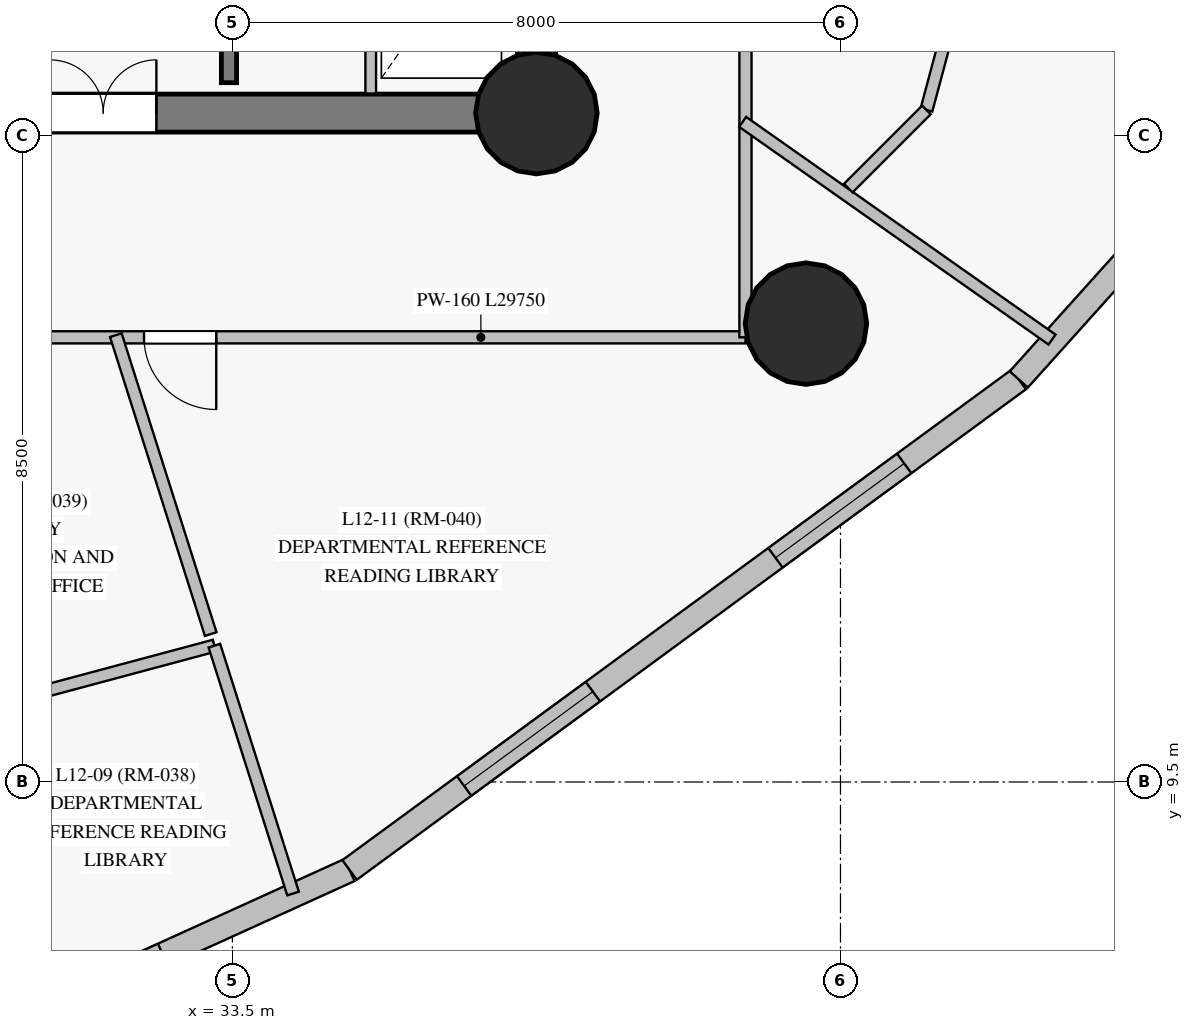
"""IFC4 building model, lengths in metres.
Left out: names, types, materials, properties, quantities, classifications, styles, units other than length and angle.
Written with IfcOpenShell. Run it as: python <this file> out.ifc"""

import sys

from ifc_helpers import new_model, si_unit, direction, frame, frame_2d, origin, origin_with_axes, origin_2d, place, context, subcontext, project, spatial, rectangle, circle, extrude, source, transform, mapped, element, fill, save


model = new_model("IFC4")
c1 = context("Model", 3, precision=1e-05, world=origin(), true_north=direction((0.0, 1.0)))
c2 = subcontext(c1, "Body", "Model", "MODEL_VIEW")
j1 = project(units=[si_unit("LENGTHUNIT", "METRE"), si_unit("PLANEANGLEUNIT", "RADIAN")], contexts=[c1])
p1 = place(None, origin())
s1 = spatial("IfcSite", under=j1, at=p1, CompositionType="ELEMENT")
p2 = place(p1, origin())
s2 = spatial("IfcBuilding", under=s1, at=p2, CompositionType="ELEMENT")
p3 = place(p2, frame((0.0, 0.0, 48.1)))
s3 = spatial("IfcBuildingStorey", under=s2, at=p3, CompositionType="ELEMENT", Elevation=48.1)
p4 = place(p3, frame((26.55, 18.3, 0.0), z_axis=(0.0, 0.0, 1.0), x_axis=(1.0, 0.0, 0.0)))
e1 = element("IfcWall", 1, at=p4, inside=s3, PredefinedType="SHEAR", context=c2, shape_type="SweptSolid", body=[
    extrude(rectangle(XDim=10.95, YDim=0.5, at=frame_2d((5.475, 0.0))), origin(), (0.0, 0.0, 1.0), 3.35),
])
p5 = place(p4, frame((4.55, 0.0, 0.0)))
e2 = element("IfcOpeningElement", 2, at=p5, cuts=e1, PredefinedType="OPENING", context=c2, shape_type="SweptSolid", body=[
    extrude(rectangle(XDim=1.4, YDim=2.2, at=frame_2d((0.7, 1.1))), frame((0.0, 0.26, 0.0), z_axis=(0.0, -1.0, 0.0), x_axis=(1.0, 0.0, 0.0)), (0.0, 0.0, 1.0), 0.52),
])
p6 = place(p3, frame((37.5, 18.3, 0.0), z_axis=(0.0, 0.0, 1.0), x_axis=(0.0, 1.0, 0.0)))
e3 = element("IfcWall", 3, at=p6, inside=s3, PredefinedType="SHEAR", context=c2, shape_type="SweptSolid", body=[
    extrude(rectangle(XDim=16.4, YDim=0.5, at=frame_2d((8.2, 0.0))), origin(), (0.0, 0.0, 1.0), 3.35),
])
p7 = place(p6, frame((14.06, 0.0, 0.0)))
e4 = element("IfcOpeningElement", 4, at=p7, cuts=e3, PredefinedType="OPENING", context=c2, shape_type="SweptSolid", body=[
    extrude(rectangle(XDim=1.2, YDim=2.15, at=frame_2d((0.6, 1.075))), frame((0.0, 0.26, 0.0), z_axis=(0.0, -1.0, 0.0), x_axis=(1.0, 0.0, 0.0)), (0.0, 0.0, 1.0), 0.52),
])
m1 = source(origin_with_axes(), c2, "Body", "SweptSolid", [
    extrude(circle(Radius=0.8, at=origin_2d()), origin(), (0.0, 0.0, 1.0), 3.6),
])
for number, where, z_axis, x_axis in (
    (5, (37.5, 18.3, 0.0), (0.0, 0.0, 1.0), (1.0, 0.0, 0.0)),
    (6, (41.046, 15.53, 0.0), (0.0, 0.0, 1.0), (1.0, 0.0, 0.0)),
):
    element("IfcColumn", number, at=place(p3, frame(where, z_axis=z_axis, x_axis=x_axis)), inside=s3, PredefinedType="COLUMN", context=c2, shape_type="MappedRepresentation", body=[
        mapped(m1, transform((0.0, 0.0, 0.0), scale=1.0)),
    ])
p8 = place(p3, frame((25.639, 4.071, 0.0), z_axis=(0.0, 0.0, 1.0), x_axis=(0.910463604795, 0.413589197567, 0.0)))
e7 = element("IfcWall", 7, at=p8, inside=s3, PredefinedType="SOLIDWALL", context=c2, shape_type="SweptSolid", body=[
    extrude(rectangle(XDim=10.327, YDim=0.32, at=frame_2d((5.164, 0.0))), origin(), (0.0, 0.0, 1.0), 3.35),
])
p9 = place(p8, frame((0.797, 0.0, 0.85)))
e8 = element("IfcOpeningElement", 8, at=p9, cuts=e7, PredefinedType="OPENING", context=c2, shape_type="SweptSolid", body=[
    extrude(rectangle(XDim=2.1, YDim=1.95, at=frame_2d((1.05, 0.975))), frame((0.0, 0.17, 0.0), z_axis=(0.0, -1.0, 0.0), x_axis=(1.0, 0.0, 0.0)), (0.0, 0.0, 1.0), 0.34),
])
p10 = place(p8, frame((5.531, 0.0, 0.85)))
e9 = element("IfcOpeningElement", 9, at=p10, cuts=e7, PredefinedType="OPENING", context=c2, shape_type="SweptSolid", body=[
    extrude(rectangle(XDim=2.1, YDim=1.95, at=frame_2d((1.05, 0.975))), frame((0.0, 0.17, 0.0), z_axis=(0.0, -1.0, 0.0), x_axis=(1.0, 0.0, 0.0)), (0.0, 0.0, 1.0), 0.34),
])
p11 = place(p3, frame((35.042, 8.343, 0.0), z_axis=(0.0, 0.0, 1.0), x_axis=(0.806545755589, 0.591171670618, 0.0)))
e10 = element("IfcWall", 10, at=p11, inside=s3, PredefinedType="SOLIDWALL", context=c2, shape_type="SweptSolid", body=[
    extrude(rectangle(XDim=10.916, YDim=0.32, at=frame_2d((5.458, 0.0))), origin(), (0.0, 0.0, 1.0), 3.35),
])
p12 = place(p11, frame((1.869, 0.0, 0.85)))
e11 = element("IfcOpeningElement", 11, at=p12, cuts=e10, PredefinedType="OPENING", context=c2, shape_type="SweptSolid", body=[
    extrude(rectangle(XDim=2.1, YDim=1.95, at=frame_2d((1.05, 0.975))), frame((0.0, 0.17, 0.0), z_axis=(0.0, -1.0, 0.0), x_axis=(1.0, 0.0, 0.0)), (0.0, 0.0, 1.0), 0.34),
])
p13 = place(p11, frame((6.947, 0.0, 0.85)))
e12 = element("IfcOpeningElement", 12, at=p13, cuts=e10, PredefinedType="OPENING", context=c2, shape_type="SweptSolid", body=[
    extrude(rectangle(XDim=2.1, YDim=1.95, at=frame_2d((1.05, 0.975))), frame((0.0, 0.17, 0.0), z_axis=(0.0, -1.0, 0.0), x_axis=(1.0, 0.0, 0.0)), (0.0, 0.0, 1.0), 0.34),
])
p14 = place(p3, frame((43.846, 14.796, 0.0), z_axis=(0.0, 0.0, 1.0), x_axis=(0.668485145509, 0.743725493871, 0.0)))
e13 = element("IfcWall", 13, at=p14, inside=s3, PredefinedType="SOLIDWALL", context=c2, shape_type="SweptSolid", body=[
    extrude(rectangle(XDim=15.698, YDim=0.32, at=frame_2d((7.849, 0.0))), origin(), (0.0, 0.0, 1.0), 3.35),
])
p15 = place(p14, frame((2.419, 0.0, 0.85)))
e14 = element("IfcOpeningElement", 14, at=p15, cuts=e13, PredefinedType="OPENING", context=c2, shape_type="SweptSolid", body=[
    extrude(rectangle(XDim=2.1, YDim=1.95, at=frame_2d((1.05, 0.975))), frame((0.0, 0.17, 0.0), z_axis=(0.0, -1.0, 0.0), x_axis=(1.0, 0.0, 0.0)), (0.0, 0.0, 1.0), 0.34),
])
p16 = place(p14, frame((7.36, 0.0, 0.85)))
e15 = element("IfcOpeningElement", 15, at=p16, cuts=e13, PredefinedType="OPENING", context=c2, shape_type="SweptSolid", body=[
    extrude(rectangle(XDim=2.1, YDim=1.95, at=frame_2d((1.05, 0.975))), frame((0.0, 0.17, 0.0), z_axis=(0.0, -1.0, 0.0), x_axis=(1.0, 0.0, 0.0)), (0.0, 0.0, 1.0), 0.34),
])
p17 = place(p14, frame((12.369, 0.0, 0.85)))
e16 = element("IfcOpeningElement", 16, at=p17, cuts=e13, PredefinedType="OPENING", context=c2, shape_type="SweptSolid", body=[
    extrude(rectangle(XDim=2.1, YDim=1.95, at=frame_2d((1.05, 0.975))), frame((0.0, 0.17, 0.0), z_axis=(0.0, -1.0, 0.0), x_axis=(1.0, 0.0, 0.0)), (0.0, 0.0, 1.0), 0.34),
])
p18 = place(p3, frame((33.455, 18.7, 0.0), z_axis=(0.0, 0.0, 1.0), x_axis=(0.0, 1.0, 0.0)))
e17 = element("IfcWall", 17, at=p18, inside=s3, PredefinedType="SHEAR", context=c2, shape_type="SweptSolid", body=[
    extrude(rectangle(XDim=15.6, YDim=0.2, at=frame_2d((7.8, 0.0))), origin(), (0.0, 0.0, 1.0), 3.35),
])
p19 = place(p18, frame((2.75, 0.0, 0.0)))
e18 = element("IfcOpeningElement", 18, at=p19, cuts=e17, PredefinedType="OPENING", context=c2, shape_type="SweptSolid", body=[
    extrude(rectangle(XDim=1.15, YDim=2.15, at=frame_2d((0.575, 1.075))), frame((0.0, 0.11, 0.0), z_axis=(0.0, -1.0, 0.0), x_axis=(1.0, 0.0, 0.0)), (0.0, 0.0, 1.0), 0.22),
])
p20 = place(p18, frame((0.55, 0.0, 0.0)))
e19 = element("IfcOpeningElement", 19, at=p20, cuts=e17, PredefinedType="OPENING", context=c2, shape_type="SweptSolid", body=[
    extrude(rectangle(XDim=0.94, YDim=2.1, at=frame_2d((0.47, 1.05))), frame((0.0, 0.11, 0.0), z_axis=(0.0, -1.0, 0.0), x_axis=(1.0, 0.0, 0.0)), (0.0, 0.0, 1.0), 0.22),
])
p21 = place(p3, frame((40.25, 15.35, 0.0), z_axis=(0.0, 0.0, 1.0), x_axis=(-1.0, 0.0, 0.0)))
e20 = element("IfcWall", 20, at=p21, inside=s3, PredefinedType="PARTITIONING", context=c2, shape_type="SweptSolid", body=[
    extrude(rectangle(XDim=29.75, YDim=0.16, at=frame_2d((14.875, 0.0))), origin(), (0.0, 0.0, 1.0), 2.7),
])
p22 = place(p21, frame((26.423, 0.0, 0.0)))
e21 = element("IfcOpeningElement", 21, at=p22, cuts=e20, PredefinedType="OPENING", context=c2, shape_type="SweptSolid", body=[
    extrude(rectangle(XDim=0.95, YDim=2.15, at=frame_2d((0.475, 1.075))), frame((0.0, 0.09, 0.0), z_axis=(0.0, -1.0, 0.0), x_axis=(1.0, 0.0, 0.0)), (0.0, 0.0, 1.0), 0.18),
])
p23 = place(p21, frame((21.837, 0.0, 0.0)))
e22 = element("IfcOpeningElement", 22, at=p23, cuts=e20, PredefinedType="OPENING", context=c2, shape_type="SweptSolid", body=[
    extrude(rectangle(XDim=0.95, YDim=2.15, at=frame_2d((0.475, 1.075))), frame((0.0, 0.09, 0.0), z_axis=(0.0, -1.0, 0.0), x_axis=(1.0, 0.0, 0.0)), (0.0, 0.0, 1.0), 0.18),
])
p24 = place(p21, frame((18.863, 0.0, 0.0)))
e23 = element("IfcOpeningElement", 23, at=p24, cuts=e20, PredefinedType="OPENING", context=c2, shape_type="SweptSolid", body=[
    extrude(rectangle(XDim=0.95, YDim=2.15, at=frame_2d((0.475, 1.075))), frame((0.0, 0.09, 0.0), z_axis=(0.0, -1.0, 0.0), x_axis=(1.0, 0.0, 0.0)), (0.0, 0.0, 1.0), 0.18),
])
p25 = place(p21, frame((16.388, 0.0, 0.0)))
e24 = element("IfcOpeningElement", 24, at=p25, cuts=e20, PredefinedType="OPENING", context=c2, shape_type="SweptSolid", body=[
    extrude(rectangle(XDim=0.95, YDim=2.15, at=frame_2d((0.475, 1.075))), frame((0.0, 0.09, 0.0), z_axis=(0.0, -1.0, 0.0), x_axis=(1.0, 0.0, 0.0)), (0.0, 0.0, 1.0), 0.18),
])
p26 = place(p21, frame((14.4, 0.0, 0.0)))
e25 = element("IfcOpeningElement", 25, at=p26, cuts=e20, PredefinedType="OPENING", context=c2, shape_type="SweptSolid", body=[
    extrude(rectangle(XDim=0.95, YDim=2.15, at=frame_2d((0.475, 1.075))), frame((0.0, 0.09, 0.0), z_axis=(0.0, -1.0, 0.0), x_axis=(1.0, 0.0, 0.0)), (0.0, 0.0, 1.0), 0.18),
])
p27 = place(p21, frame((12.118, 0.0, 0.0)))
e26 = element("IfcOpeningElement", 26, at=p27, cuts=e20, PredefinedType="OPENING", context=c2, shape_type="SweptSolid", body=[
    extrude(rectangle(XDim=0.95, YDim=2.15, at=frame_2d((0.475, 1.075))), frame((0.0, 0.09, 0.0), z_axis=(0.0, -1.0, 0.0), x_axis=(1.0, 0.0, 0.0)), (0.0, 0.0, 1.0), 0.18),
])
p28 = place(p21, frame((9.938, 0.0, 0.0)))
e27 = element("IfcOpeningElement", 27, at=p28, cuts=e20, PredefinedType="OPENING", context=c2, shape_type="SweptSolid", body=[
    extrude(rectangle(XDim=0.95, YDim=2.15, at=frame_2d((0.475, 1.075))), frame((0.0, 0.09, 0.0), z_axis=(0.0, -1.0, 0.0), x_axis=(1.0, 0.0, 0.0)), (0.0, 0.0, 1.0), 0.18),
])
p29 = place(p21, frame((6.962, 0.0, 0.0)))
e28 = element("IfcOpeningElement", 28, at=p29, cuts=e20, PredefinedType="OPENING", context=c2, shape_type="SweptSolid", body=[
    extrude(rectangle(XDim=0.95, YDim=2.15, at=frame_2d((0.475, 1.075))), frame((0.0, 0.09, 0.0), z_axis=(0.0, -1.0, 0.0), x_axis=(1.0, 0.0, 0.0)), (0.0, 0.0, 1.0), 0.18),
])
p30 = place(p3, frame((40.25, 37.65, 0.0), z_axis=(0.0, 0.0, 1.0), x_axis=(0.0, -1.0, 0.0)))
e29 = element("IfcWall", 29, at=p30, inside=s3, PredefinedType="PARTITIONING", context=c2, shape_type="SweptSolid", body=[
    extrude(rectangle(XDim=22.3, YDim=0.16, at=frame_2d((11.15, 0.0))), origin(), (0.0, 0.0, 1.0), 2.75),
])
p31 = place(p30, frame((14.02, 0.0, 0.0)))
e30 = element("IfcOpeningElement", 30, at=p31, cuts=e29, PredefinedType="OPENING", context=c2, shape_type="SweptSolid", body=[
    extrude(rectangle(XDim=0.95, YDim=2.15, at=frame_2d((0.475, 1.075))), frame((0.0, 0.09, 0.0), z_axis=(0.0, -1.0, 0.0), x_axis=(1.0, 0.0, 0.0)), (0.0, 0.0, 1.0), 0.18),
])
p32 = place(p30, frame((10.915, 0.0, 0.0)))
e31 = element("IfcOpeningElement", 31, at=p32, cuts=e29, PredefinedType="OPENING", context=c2, shape_type="SweptSolid", body=[
    extrude(rectangle(XDim=0.95, YDim=2.15, at=frame_2d((0.475, 1.075))), frame((0.0, 0.09, 0.0), z_axis=(0.0, -1.0, 0.0), x_axis=(1.0, 0.0, 0.0)), (0.0, 0.0, 1.0), 0.18),
])
p33 = place(p30, frame((7.051, 0.0, 0.0)))
e32 = element("IfcOpeningElement", 32, at=p33, cuts=e29, PredefinedType="OPENING", context=c2, shape_type="SweptSolid", body=[
    extrude(rectangle(XDim=0.86, YDim=2.1, at=frame_2d((0.43, 1.05))), frame((0.0, 0.09, 0.0), z_axis=(0.0, -1.0, 0.0), x_axis=(1.0, 0.0, 0.0)), (0.0, 0.0, 1.0), 0.18),
])
p34 = place(p30, frame((3.49, 0.0, 0.0)))
e33 = element("IfcOpeningElement", 33, at=p34, cuts=e29, PredefinedType="OPENING", context=c2, shape_type="SweptSolid", body=[
    extrude(rectangle(XDim=0.95, YDim=2.15, at=frame_2d((0.475, 1.075))), frame((0.0, 0.09, 0.0), z_axis=(0.0, -1.0, 0.0), x_axis=(1.0, 0.0, 0.0)), (0.0, 0.0, 1.0), 0.18),
])
p35 = place(p30, frame((1.36, 0.0, 0.0)))
e34 = element("IfcOpeningElement", 34, at=p35, cuts=e29, PredefinedType="OPENING", context=c2, shape_type="SweptSolid", body=[
    extrude(rectangle(XDim=0.95, YDim=2.15, at=frame_2d((0.475, 1.075))), frame((0.0, 0.09, 0.0), z_axis=(0.0, -1.0, 0.0), x_axis=(1.0, 0.0, 0.0)), (0.0, 0.0, 1.0), 0.18),
])
p36 = place(p30, frame((0.263, 0.0, 0.0)))
e35 = element("IfcOpeningElement", 35, at=p36, cuts=e29, PredefinedType="OPENING", context=c2, shape_type="SweptSolid", body=[
    extrude(rectangle(XDim=0.95, YDim=2.15, at=frame_2d((0.475, 1.075))), frame((0.0, 0.09, 0.0), z_axis=(0.0, -1.0, 0.0), x_axis=(1.0, 0.0, 0.0)), (0.0, 0.0, 1.0), 0.18),
])
p37 = place(p30, frame((15.155, 0.0, 0.0)))
e36 = element("IfcOpeningElement", 36, at=p37, cuts=e29, PredefinedType="OPENING", context=c2, shape_type="SweptSolid", body=[
    extrude(rectangle(XDim=0.95, YDim=2.15, at=frame_2d((0.475, 1.075))), frame((0.0, 0.09, 0.0), z_axis=(0.0, -1.0, 0.0), x_axis=(1.0, 0.0, 0.0)), (0.0, 0.0, 1.0), 0.18),
])
p38 = place(p30, frame((5.17, 0.0, 0.0)))
e37 = element("IfcOpeningElement", 37, at=p38, cuts=e29, PredefinedType="OPENING", context=c2, shape_type="SweptSolid", body=[
    extrude(rectangle(XDim=0.86, YDim=2.04, at=frame_2d((0.43, 1.02))), frame((0.0, 0.09, 0.0), z_axis=(0.0, -1.0, 0.0), x_axis=(1.0, 0.0, 0.0)), (0.0, 0.0, 1.0), 0.18),
])
p39 = place(p3, frame((44.197, 24.187, 0.0), z_axis=(0.0, 0.0, 1.0), x_axis=(-0.258810027393, -0.965928242532, 0.0)))
e38 = element("IfcWall", 38, at=p39, inside=s3, PredefinedType="PARTITIONING", context=c2, shape_type="SweptSolid", body=[
    extrude(rectangle(XDim=6.052, YDim=0.16, at=frame_2d((3.026, 0.0))), origin(), (0.0, 0.0, 1.0), 2.75),
])
p40 = place(p39, frame((1.511, 0.0, 0.0)))
e39 = element("IfcOpeningElement", 39, at=p40, cuts=e38, PredefinedType="OPENING", context=c2, shape_type="SweptSolid", body=[
    extrude(rectangle(XDim=0.95, YDim=2.15, at=frame_2d((0.475, 1.075))), frame((0.0, 0.09, 0.0), z_axis=(0.0, -1.0, 0.0), x_axis=(1.0, 0.0, 0.0)), (0.0, 0.0, 1.0), 0.18),
])
p41 = place(p3, frame((40.213, 18.184, 0.0), z_axis=(0.0, 0.0, 1.0), x_axis=(0.817839768115, -0.575446012836, 0.0)))
e40 = element("IfcWall", 40, at=p41, inside=s3, PredefinedType="PARTITIONING", context=c2, shape_type="SweptSolid", body=[
    extrude(rectangle(XDim=4.977, YDim=0.16, at=frame_2d((2.488, 0.0))), origin(), (0.0, 0.0, 1.0), 3.35),
])
p42 = place(p3, frame((28.905, 10.126, 0.0), z_axis=(0.0, 0.0, 1.0), x_axis=(0.965928004667, 0.258810915149, 0.0)))
e41 = element("IfcWall", 41, at=p42, inside=s3, PredefinedType="PARTITIONING", context=c2, shape_type="SweptSolid", body=[
    extrude(rectangle(XDim=4.512, YDim=0.16, at=frame_2d((2.256, 0.0))), origin(), (0.0, 0.0, 1.0), 2.75),
])
p43 = place(p3, frame((31.967, 15.379, 0.0), z_axis=(0.0, 0.0, 1.0), x_axis=(0.302490392513, -0.953152433999, 0.0)))
e42 = element("IfcWall", 42, at=p43, inside=s3, PredefinedType="PARTITIONING", context=c2, shape_type="SweptSolid", body=[
    extrude(rectangle(XDim=4.126, YDim=0.16, at=frame_2d((2.063, 0.0))), origin(), (0.0, 0.0, 1.0), 3.35),
])
p44 = place(p3, frame((33.263, 11.293, 0.0), z_axis=(0.0, 0.0, 1.0), x_axis=(0.302449465178, -0.953165421642, 0.0)))
e43 = element("IfcWall", 43, at=p44, inside=s3, PredefinedType="PARTITIONING", context=c2, shape_type="SweptSolid", body=[
    extrude(rectangle(XDim=3.421, YDim=0.16, at=frame_2d((1.71, 0.0))), origin(), (0.0, 0.0, 1.0), 3.35),
])
p45 = place(p3, frame((35.32, 18.557, 0.0), z_axis=(0.0, 0.0, 1.0), x_axis=(0.0, 1.0, 0.0)))
e44 = element("IfcWall", 44, at=p45, inside=s3, PredefinedType="PARTITIONING", context=c2, shape_type="SweptSolid", body=[
    extrude(rectangle(XDim=2.553, YDim=0.14, at=frame_2d((1.277, 0.0))), origin(), (0.0, 0.0, 1.0), 3.35),
])
p46 = place(p3, frame((42.631, 18.341, 0.0), z_axis=(0.0, 0.0, 1.0), x_axis=(-0.707190705793, -0.707022846618, 0.0)))
e45 = element("IfcWall", 45, at=p46, inside=s3, PredefinedType="PARTITIONING", context=c2, shape_type="SweptSolid", body=[
    extrude(rectangle(XDim=1.454, YDim=0.16, at=frame_2d((0.727, 0.0))), origin(), (0.0, 0.0, 1.0), 2.75),
])
m2 = source(origin_with_axes(), c2, "Body", "SweptSolid", [
    extrude(rectangle(XDim=2.1, YDim=1.95, at=frame_2d((1.05, 0.975))), frame((0.0, 0.03, 0.0), z_axis=(0.0, -1.0, 0.0), x_axis=(1.0, 0.0, 0.0)), (0.0, 0.0, 1.0), 0.06),
])
p47 = place(p12, origin())
e46 = element("IfcWindow", 46, at=p47, inside=s3, PartitioningType="SINGLE_PANEL", PredefinedType="WINDOW", context=c2, shape_type="MappedRepresentation", body=[
    mapped(m2, transform((0.0, 0.0, 0.0), scale=1.0)),
])
fill(e11, e46)
p48 = place(p13, origin())
e47 = element("IfcWindow", 47, at=p48, inside=s3, PartitioningType="SINGLE_PANEL", PredefinedType="WINDOW", context=c2, shape_type="MappedRepresentation", body=[
    mapped(m2, transform((0.0, 0.0, 0.0), scale=1.0)),
])
fill(e12, e47)
m3 = source(origin_with_axes(), c2, "Body", "SweptSolid", [
    extrude(rectangle(XDim=1.4, YDim=2.2, at=frame_2d((0.7, 1.1))), frame((0.0, 0.025, 0.0), z_axis=(0.0, -1.0, 0.0), x_axis=(1.0, 0.0, 0.0)), (0.0, 0.0, 1.0), 0.05),
])
p49 = place(p5, origin())
e48 = element("IfcDoor", 48, at=p49, inside=s3, OperationType="DOUBLE_DOOR_SINGLE_SWING", PredefinedType="DOOR", context=c2, shape_type="MappedRepresentation", body=[
    mapped(m3, transform((0.0, 0.0, 0.0), scale=1.0)),
])
fill(e2, e48)
m4 = source(origin_with_axes(), c2, "Body", "SweptSolid", [
    extrude(rectangle(XDim=0.95, YDim=2.15, at=frame_2d((0.475, 1.075))), frame((0.0, 0.025, 0.0), z_axis=(0.0, -1.0, 0.0), x_axis=(1.0, 0.0, 0.0)), (0.0, 0.0, 1.0), 0.05),
])
p50 = place(p29, origin())
e49 = element("IfcDoor", 49, at=p50, inside=s3, OperationType="SINGLE_SWING_LEFT", PredefinedType="DOOR", context=c2, shape_type="MappedRepresentation", body=[
    mapped(m4, transform((0.0, 0.0, 0.0), scale=1.0)),
])
fill(e28, e49)
save(model, sys.argv[1])
